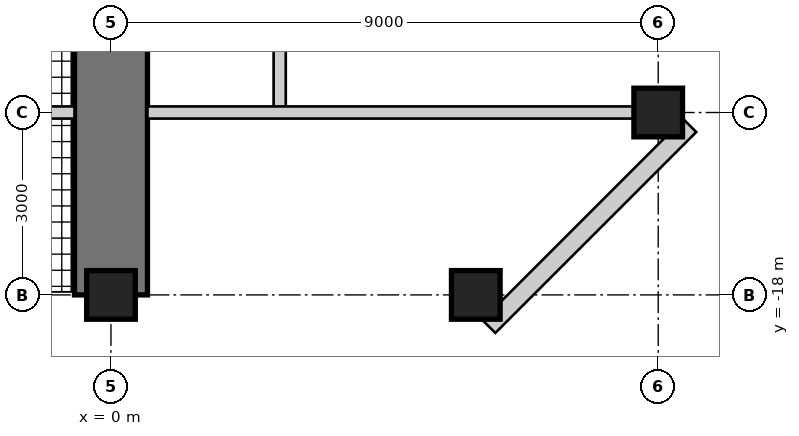
"""IFC4 building model, lengths in metres.
Left out: names, types, materials, properties, quantities, classifications, styles, units other than length and angle.
Written with IfcOpenShell. Run it as: python <this file> out.ifc"""

import sys

from ifc_helpers import new_model, si_unit, direction, frame, frame_2d, origin, origin_2d, place, context, subcontext, project, spatial, rectangle, hollow_rectangle, extrude, element, fill, save


model = new_model("IFC4")
c1 = context("Model", 3, precision=1e-05, world=origin(), true_north=direction((0.0, 1.0)))
c2 = subcontext(c1, "Body", "Model", "MODEL_VIEW")
j1 = project(units=[si_unit("LENGTHUNIT", "METRE"), si_unit("PLANEANGLEUNIT", "RADIAN")], contexts=[c1])
p1 = place(None, origin())
s1 = spatial("IfcSite", under=j1, at=p1, CompositionType="ELEMENT")
p2 = place(p1, origin())
s2 = spatial("IfcBuilding", under=s1, at=p2, CompositionType="ELEMENT")
p3 = place(p2, frame((0.0, 0.0, 235.7)))
s3 = spatial("IfcBuildingStorey", under=s2, at=p3, CompositionType="ELEMENT", Elevation=235.7)
p4 = place(p3, frame((0.0, -9.0, 0.0), z_axis=(0.0, 0.0, 1.0), x_axis=(0.0, -1.0, 0.0)))
e1 = element("IfcWall", 1, at=p4, inside=s3, PredefinedType="SHEAR", context=c2, shape_type="SweptSolid", body=[
    extrude(rectangle(XDim=9.0, YDim=1.2, at=frame_2d((4.5, 0.0))), origin(), (0.0, 0.0, 1.0), 3.4),
])
p5 = place(p4, frame((3.8, 0.0, 0.0)))
e2 = element("IfcOpeningElement", 2, at=p5, cuts=e1, PredefinedType="OPENING", context=c2, shape_type="SweptSolid", body=[
    extrude(rectangle(XDim=1.0, YDim=2.15, at=frame_2d((0.5, 1.075))), frame((0.0, 0.61, 0.0), z_axis=(0.0, -1.0, 0.0), x_axis=(1.0, 0.0, 0.0)), (0.0, 0.0, 1.0), 1.22),
])
p6 = place(p4, frame((7.0, 0.0, 0.0)))
e3 = element("IfcOpeningElement", 3, at=p6, cuts=e1, PredefinedType="OPENING", context=c2, shape_type="SweptSolid", body=[
    extrude(rectangle(XDim=1.0, YDim=2.2, at=frame_2d((0.5, 1.1))), frame((0.0, 0.61, 0.0), z_axis=(0.0, -1.0, 0.0), x_axis=(1.0, 0.0, 0.0)), (0.0, 0.0, 1.0), 1.22),
])
for number, where, z_axis, x_axis in (
    (4, (9.0, -15.0, 0.0), (0.0, 0.0, 1.0), (1.0, 0.0, 0.0)),
    (5, (0.0, -18.0, 0.0), (0.0, 0.0, 1.0), (1.0, 0.0, 0.0)),
    (6, (6.0, -18.0, 0.0), (0.0, 0.0, 1.0), (1.0, 0.0, 0.0)),
):
    element("IfcColumn", number, at=place(p3, frame(where, z_axis=z_axis, x_axis=x_axis)), inside=s3, PredefinedType="COLUMN", context=c2, shape_type="SweptSolid", body=[
        extrude(rectangle(XDim=0.8, YDim=0.8, at=origin_2d()), origin(), (0.0, 0.0, 1.0), 3.4),
    ])
p7 = place(p3, frame((6.215, -18.52, 0.0), z_axis=(0.0, 0.0, 1.0), x_axis=(0.707106781187, 0.707106781187, 0.0)))
e7 = element("IfcWall", 7, at=p7, inside=s3, PredefinedType="SOLIDWALL", context=c2, shape_type="SweptSolid", body=[
    extrude(rectangle(XDim=4.674, YDim=0.3, at=frame_2d((2.337, 0.0))), origin(), (0.0, 0.0, 1.0), 3.22),
])
p8 = place(p7, frame((1.887, 0.0, 0.3)))
e8 = element("IfcOpeningElement", 8, at=p8, cuts=e7, PredefinedType="OPENING", context=c2, shape_type="SweptSolid", body=[
    extrude(rectangle(XDim=0.9, YDim=2.4, at=frame_2d((0.45, 1.2))), frame((0.0, 0.16, 0.0), z_axis=(0.0, -1.0, 0.0), x_axis=(1.0, 0.0, 0.0)), (0.0, 0.0, 1.0), 0.32),
])
p9 = place(p3, frame((2.775, -9.4, 0.0), z_axis=(0.0, 0.0, 1.0), x_axis=(0.0, -1.0, 0.0)))
e9 = element("IfcWall", 9, at=p9, inside=s3, PredefinedType="SOLIDWALL", context=c2, shape_type="SweptSolid", body=[
    extrude(rectangle(XDim=5.6, YDim=0.2, at=frame_2d((2.8, 0.0))), origin(), (0.0, 0.0, 1.0), 3.22),
])
p10 = place(p9, frame((3.75, 0.0, 0.0)))
e10 = element("IfcOpeningElement", 10, at=p10, cuts=e9, PredefinedType="OPENING", context=c2, shape_type="SweptSolid", body=[
    extrude(rectangle(XDim=1.0, YDim=2.15, at=frame_2d((0.5, 1.075))), frame((0.0, 0.11, 0.0), z_axis=(0.0, -1.0, 0.0), x_axis=(1.0, 0.0, 0.0)), (0.0, 0.0, 1.0), 0.22),
])
p11 = place(p3, frame((-8.6, -15.0, 0.0), z_axis=(0.0, 0.0, 1.0), x_axis=(1.0, 0.0, 0.0)))
e11 = element("IfcWall", 11, at=p11, inside=s3, PredefinedType="SOLIDWALL", context=c2, shape_type="SweptSolid", body=[
    extrude(rectangle(XDim=8.0, YDim=0.2, at=frame_2d((4.0, 0.0))), origin(), (0.0, 0.0, 1.0), 2.52),
])
p12 = place(p3, frame((0.6, -15.0, 0.0), z_axis=(0.0, 0.0, 1.0), x_axis=(1.0, 0.0, 0.0)))
e12 = element("IfcWall", 12, at=p12, inside=s3, PredefinedType="SOLIDWALL", context=c2, shape_type="SweptSolid", body=[
    extrude(rectangle(XDim=8.0, YDim=0.2, at=frame_2d((4.0, 0.0))), origin(), (0.0, 0.0, 1.0), 2.52),
])
p13 = place(p12, frame((0.35, 0.0, 0.0)))
e13 = element("IfcOpeningElement", 13, at=p13, cuts=e12, PredefinedType="OPENING", context=c2, shape_type="SweptSolid", body=[
    extrude(rectangle(XDim=1.0, YDim=2.2, at=frame_2d((0.5, 1.1))), frame((0.0, 0.11, 0.0), z_axis=(0.0, -1.0, 0.0), x_axis=(1.0, 0.0, 0.0)), (0.0, 0.0, 1.0), 0.22),
])
p14 = place(p8, origin())
e14 = element("IfcWindow", 14, at=p14, inside=s3, PartitioningType="SINGLE_PANEL", PredefinedType="WINDOW", context=c2, shape_type="SweptSolid", body=[
    extrude(hollow_rectangle(XDim=0.9, YDim=2.4, WallThickness=0.06, at=frame_2d((0.45, 1.2))), frame((0.0, 0.03, 0.0), z_axis=(0.0, -1.0, 0.0), x_axis=(1.0, 0.0, 0.0)), (0.0, 0.0, 1.0), 0.06),
    extrude(rectangle(XDim=0.779, YDim=2.279, at=frame_2d((0.45, 1.2))), frame((0.0, 0.03, 0.0), z_axis=(0.0, -1.0, 0.0), x_axis=(1.0, 0.0, 0.0)), (0.0, 0.0, 1.0), 0.06),
])
fill(e8, e14)
p15 = place(p10, origin())
e15 = element("IfcDoor", 15, at=p15, inside=s3, OperationType="SINGLE_SWING_LEFT", PredefinedType="DOOR", context=c2, shape_type="SweptSolid", body=[
    extrude(rectangle(XDim=1.0, YDim=2.15, at=frame_2d((0.5, 1.075))), frame((0.0, 0.025, 0.0), z_axis=(0.0, -1.0, 0.0), x_axis=(1.0, 0.0, 0.0)), (0.0, 0.0, 1.0), 0.05),
])
fill(e10, e15)
p16 = place(p13, frame((1.0, 0.0, 0.0), z_axis=(0.0, 0.0, 1.0), x_axis=(-1.0, 0.0, 0.0)))
e16 = element("IfcDoor", 16, at=p16, inside=s3, OperationType="SINGLE_SWING_LEFT", PredefinedType="DOOR", context=c2, shape_type="SweptSolid", body=[
    extrude(rectangle(XDim=1.0, YDim=2.2, at=frame_2d((0.5, 1.1))), frame((0.0, 0.025, 0.0), z_axis=(0.0, -1.0, 0.0), x_axis=(1.0, 0.0, 0.0)), (0.0, 0.0, 1.0), 0.05),
])
fill(e13, e16)
p17 = place(p6, origin())
e17 = element("IfcDoor", 17, at=p17, inside=s3, OperationType="SINGLE_SWING_LEFT", PredefinedType="DOOR", context=c2, shape_type="SweptSolid", body=[
    extrude(rectangle(XDim=1.0, YDim=2.2, at=frame_2d((0.5, 1.1))), frame((0.0, 0.025, 0.0), z_axis=(0.0, -1.0, 0.0), x_axis=(1.0, 0.0, 0.0)), (0.0, 0.0, 1.0), 0.05),
])
fill(e3, e17)
save(model, sys.argv[1])
